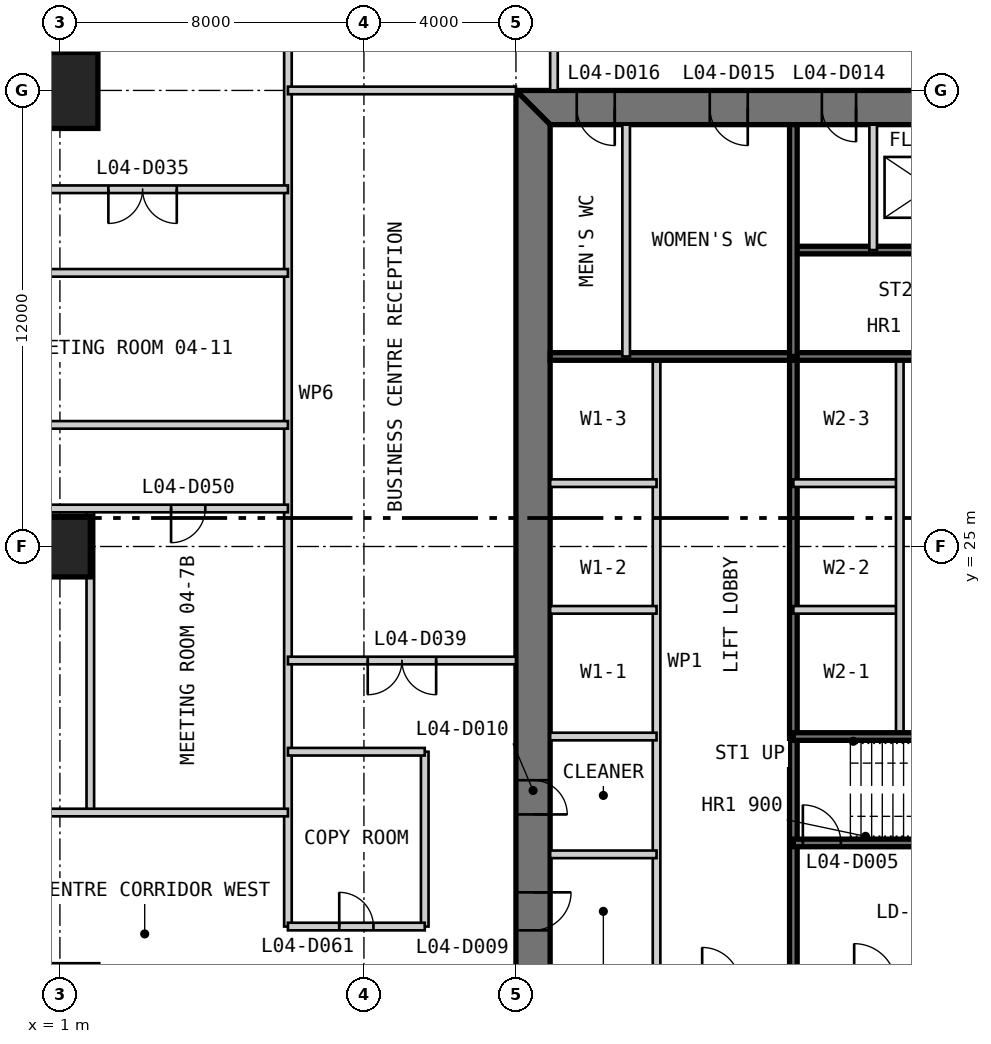
"""IFC4 building model, lengths in metres.
Left out: names, types, materials, properties, quantities, classifications, styles, units other than length and angle.
Written with IfcOpenShell. Run it as: python <this file> out.ifc"""

import sys

from ifc_helpers import new_model, si_unit, direction, frame, frame_2d, origin, origin_2d, place, context, subcontext, project, spatial, polyline, rectangle, outline, extrude, element, fill, save


model = new_model("IFC4")
c1 = context("Model", 3, precision=1e-05, world=origin(), true_north=direction((0.0, 1.0)))
c2 = subcontext(c1, "Body", "Model", "MODEL_VIEW")
j1 = project(units=[si_unit("LENGTHUNIT", "METRE"), si_unit("PLANEANGLEUNIT", "RADIAN")], contexts=[c1])
p1 = place(None, origin())
s1 = spatial("IfcSite", under=j1, at=p1, CompositionType="ELEMENT")
p2 = place(p1, origin())
s2 = spatial("IfcBuilding", under=s1, at=p2, CompositionType="ELEMENT")
p3 = place(p2, frame((0.0, 0.0, 21.4)))
s3 = spatial("IfcBuildingStorey", under=s2, at=p3, CompositionType="ELEMENT", Elevation=21.4)
p4 = place(p3, frame((1.0, 37.0, 0.0), z_axis=(0.0, 0.0, 1.0), x_axis=(1.0, 0.0, 0.0)))
e1 = element("IfcColumn", 1, at=p4, inside=s3, PredefinedType="COLUMN", context=c2, shape_type="SweptSolid", body=[
    extrude(rectangle(XDim=2.0, YDim=2.0, at=origin_2d()), origin(), (0.0, 0.0, 1.0), 4.8),
])
p5 = place(p3, frame((1.0, 25.0, 0.0), z_axis=(0.0, 0.0, 1.0), x_axis=(1.0, 0.0, 0.0)))
e2 = element("IfcColumn", 2, at=p5, inside=s3, PredefinedType="COLUMN", context=c2, shape_type="SweptSolid", body=[
    extrude(rectangle(XDim=1.6, YDim=1.6, at=origin_2d()), origin(), (0.0, 0.0, 1.0), 4.8),
])
p6 = place(p3, frame((37.0, 36.55, 0.0), z_axis=(0.0, 0.0, 1.0), x_axis=(-1.0, 0.0, 0.0)))
e3 = element("IfcWall", 3, at=p6, inside=s3, PredefinedType="SHEAR", context=c2, shape_type="SweptSolid", body=[
    extrude(outline(polyline([(0.0, -0.45), (24.0, -0.45), (23.1, 0.45), (0.9, 0.45), (0.0, -0.45)])), origin(), (0.0, 0.0, 1.0), 4.8),
])
p7 = place(p6, frame((4.9, 0.0, 0.0)))
e4 = element("IfcOpeningElement", 4, at=p7, cuts=e3, PredefinedType="OPENING", context=c2, shape_type="SweptSolid", body=[
    extrude(rectangle(XDim=1.0, YDim=2.2, at=frame_2d((0.5, 1.1))), frame((0.0, 0.46, 0.0), z_axis=(0.0, -1.0, 0.0), x_axis=(1.0, 0.0, 0.0)), (0.0, 0.0, 1.0), 0.92),
])
p8 = place(p6, frame((8.9, 0.0, 0.0)))
e5 = element("IfcOpeningElement", 5, at=p8, cuts=e3, PredefinedType="OPENING", context=c2, shape_type="SweptSolid", body=[
    extrude(rectangle(XDim=1.1, YDim=2.2, at=frame_2d((0.55, 1.1))), frame((0.0, 0.46, 0.0), z_axis=(0.0, -1.0, 0.0), x_axis=(1.0, 0.0, 0.0)), (0.0, 0.0, 1.0), 0.92),
])
p9 = place(p6, frame((15.05, 0.0, 0.0)))
e6 = element("IfcOpeningElement", 6, at=p9, cuts=e3, PredefinedType="OPENING", context=c2, shape_type="SweptSolid", body=[
    extrude(rectangle(XDim=0.9, YDim=2.2, at=frame_2d((0.45, 1.1))), frame((0.0, 0.46, 0.0), z_axis=(0.0, -1.0, 0.0), x_axis=(1.0, 0.0, 0.0)), (0.0, 0.0, 1.0), 0.92),
])
p10 = place(p6, frame((17.9, 0.0, 0.0)))
e7 = element("IfcOpeningElement", 7, at=p10, cuts=e3, PredefinedType="OPENING", context=c2, shape_type="SweptSolid", body=[
    extrude(rectangle(XDim=1.0, YDim=2.2, at=frame_2d((0.5, 1.1))), frame((0.0, 0.46, 0.0), z_axis=(0.0, -1.0, 0.0), x_axis=(1.0, 0.0, 0.0)), (0.0, 0.0, 1.0), 0.92),
])
p11 = place(p6, frame((21.4, 0.0, 0.0)))
e8 = element("IfcOpeningElement", 8, at=p11, cuts=e3, PredefinedType="OPENING", context=c2, shape_type="SweptSolid", body=[
    extrude(rectangle(XDim=1.0, YDim=2.2, at=frame_2d((0.5, 1.1))), frame((0.0, 0.46, 0.0), z_axis=(0.0, -1.0, 0.0), x_axis=(1.0, 0.0, 0.0)), (0.0, 0.0, 1.0), 0.92),
])
p12 = place(p3, frame((13.45, 36.1, 0.0), z_axis=(0.0, 0.0, 1.0), x_axis=(0.0, -1.0, 0.0)))
e9 = element("IfcWall", 9, at=p12, inside=s3, PredefinedType="SHEAR", context=c2, shape_type="SweptSolid", body=[
    extrude(outline(polyline([(-0.9, -0.45), (23.1, -0.45), (22.2, 0.45), (0.0, 0.45), (-0.9, -0.45)])), origin(), (0.0, 0.0, 1.0), 4.8),
])
p13 = place(p12, frame((20.2, 0.0, 0.0)))
e10 = element("IfcOpeningElement", 10, at=p13, cuts=e9, PredefinedType="OPENING", context=c2, shape_type="SweptSolid", body=[
    extrude(rectangle(XDim=1.0, YDim=2.2, at=frame_2d((0.5, 1.1))), frame((0.0, 0.46, 0.0), z_axis=(0.0, -1.0, 0.0), x_axis=(1.0, 0.0, 0.0)), (0.0, 0.0, 1.0), 0.92),
])
p14 = place(p12, frame((17.25, 0.0, 0.0)))
e11 = element("IfcOpeningElement", 11, at=p14, cuts=e9, PredefinedType="OPENING", context=c2, shape_type="SweptSolid", body=[
    extrude(rectangle(XDim=0.9, YDim=2.2, at=frame_2d((0.45, 1.1))), frame((0.0, 0.46, 0.0), z_axis=(0.0, -1.0, 0.0), x_axis=(1.0, 0.0, 0.0)), (0.0, 0.0, 1.0), 0.92),
])
p15 = place(p3, frame((16.7, 13.9, 0.0), z_axis=(0.0, 0.0, 1.0), x_axis=(0.0, 1.0, 0.0)))
e12 = element("IfcWall", 12, at=p15, inside=s3, PredefinedType="PARTITIONING", context=c2, shape_type="SweptSolid", body=[
    extrude(rectangle(XDim=16.1, YDim=0.2, at=frame_2d((8.05, 0.0))), origin(), (0.0, 0.0, 1.0), 4.6),
])
p16 = place(p3, frame((20.3, 13.9, 0.0), z_axis=(0.0, 0.0, 1.0), x_axis=(0.0, 1.0, 0.0)))
e13 = element("IfcWall", 13, at=p16, inside=s3, PredefinedType="SOLIDWALL", context=c2, shape_type="SweptSolid", body=[
    extrude(rectangle(XDim=16.1, YDim=0.2, at=frame_2d((8.05, 0.0))), origin(), (0.0, 0.0, 1.0), 4.6),
])
for number, where, z_axis, x_axis in (
    (14, (13.9, 20.0, 0.0), (0.0, 0.0, 1.0), (1.0, 0.0, 0.0)),
    (15, (13.9, 23.333, 0.0), (0.0, 0.0, 1.0), (1.0, 0.0, 0.0)),
    (16, (13.9, 26.667, 0.0), (0.0, 0.0, 1.0), (1.0, 0.0, 0.0)),
    (17, (20.3, 23.333, 0.0), (0.0, 0.0, 1.0), (1.0, 0.0, 0.0)),
    (18, (20.3, 26.667, 0.0), (0.0, 0.0, 1.0), (1.0, 0.0, 0.0)),
):
    element("IfcWall", number, at=place(p3, frame(where, z_axis=z_axis, x_axis=x_axis)), inside=s3, PredefinedType="PARTITIONING", context=c2, shape_type="SweptSolid", body=[
        extrude(rectangle(XDim=2.8, YDim=0.2, at=frame_2d((1.4, 0.0))), origin(), (0.0, 0.0, 1.0), 4.6),
    ])
p17 = place(p3, frame((23.1, 20.0, 0.0), z_axis=(0.0, 0.0, 1.0), x_axis=(0.0, 1.0, 0.0)))
e19 = element("IfcWall", 19, at=p17, inside=s3, PredefinedType="PARTITIONING", context=c2, shape_type="SweptSolid", body=[
    extrude(rectangle(XDim=10.0, YDim=0.2, at=frame_2d((5.0, 0.0))), origin(), (0.0, 0.0, 1.0), 4.6),
])
p18 = place(p3, frame((20.3, 17.2, 0.0), z_axis=(0.0, 0.0, 1.0), x_axis=(1.0, 0.0, 0.0)))
e20 = element("IfcWall", 20, at=p18, inside=s3, PredefinedType="SOLIDWALL", context=c2, shape_type="SweptSolid", body=[
    extrude(rectangle(XDim=9.4, YDim=0.2, at=frame_2d((4.7, 0.0))), origin(), (0.0, 0.0, 1.0), 4.6),
])
p19 = place(p18, frame((0.25, 0.0, 0.0)))
e21 = element("IfcOpeningElement", 21, at=p19, cuts=e20, PredefinedType="OPENING", context=c2, shape_type="SweptSolid", body=[
    extrude(rectangle(XDim=1.0, YDim=2.2, at=frame_2d((0.5, 1.1))), frame((0.0, 0.11, 0.0), z_axis=(0.0, -1.0, 0.0), x_axis=(1.0, 0.0, 0.0)), (0.0, 0.0, 1.0), 0.22),
])
p20 = place(p3, frame((20.3, 20.0, 0.0), z_axis=(0.0, 0.0, 1.0), x_axis=(1.0, 0.0, 0.0)))
e22 = element("IfcWall", 22, at=p20, inside=s3, PredefinedType="SOLIDWALL", context=c2, shape_type="SweptSolid", body=[
    extrude(rectangle(XDim=15.8, YDim=0.2, at=frame_2d((7.9, 0.0))), origin(), (0.0, 0.0, 1.0), 4.6),
])
p21 = place(p3, frame((13.9, 16.9, 0.0), z_axis=(0.0, 0.0, 1.0), x_axis=(1.0, 0.0, 0.0)))
e23 = element("IfcWall", 23, at=p21, inside=s3, PredefinedType="PARTITIONING", context=c2, shape_type="SweptSolid", body=[
    extrude(rectangle(XDim=2.8, YDim=0.2, at=frame_2d((1.4, 0.0))), origin(), (0.0, 0.0, 1.0), 4.6),
])
p22 = place(p3, frame((29.7, 32.8, 0.0), z_axis=(0.0, 0.0, 1.0), x_axis=(-1.0, 0.0, 0.0)))
e24 = element("IfcWall", 24, at=p22, inside=s3, PredefinedType="SOLIDWALL", context=c2, shape_type="SweptSolid", body=[
    extrude(rectangle(XDim=9.4, YDim=0.2, at=frame_2d((4.7, 0.0))), origin(), (0.0, 0.0, 1.0), 4.6),
])
p23 = place(p22, frame((0.25, 0.0, 0.0)))
e25 = element("IfcOpeningElement", 25, at=p23, cuts=e24, PredefinedType="OPENING", context=c2, shape_type="SweptSolid", body=[
    extrude(rectangle(XDim=1.0, YDim=2.2, at=frame_2d((0.5, 1.1))), frame((0.0, 0.11, 0.0), z_axis=(0.0, -1.0, 0.0), x_axis=(1.0, 0.0, 0.0)), (0.0, 0.0, 1.0), 0.22),
])
p24 = place(p3, frame((29.7, 30.0, 0.0), z_axis=(0.0, 0.0, 1.0), x_axis=(-1.0, 0.0, 0.0)))
e26 = element("IfcWall", 26, at=p24, inside=s3, PredefinedType="SOLIDWALL", context=c2, shape_type="SweptSolid", body=[
    extrude(rectangle(XDim=15.8, YDim=0.2, at=frame_2d((7.9, 0.0))), origin(), (0.0, 0.0, 1.0), 4.6),
])
p25 = place(p3, frame((22.4, 36.1, 0.0), z_axis=(0.0, 0.0, 1.0), x_axis=(0.0, -1.0, 0.0)))
e27 = element("IfcWall", 27, at=p25, inside=s3, PredefinedType="PARTITIONING", context=c2, shape_type="SweptSolid", body=[
    extrude(rectangle(XDim=3.3, YDim=0.2, at=frame_2d((1.65, 0.0))), origin(), (0.0, 0.0, 1.0), 4.6),
])
p26 = place(p3, frame((20.3, 36.1, 0.0), z_axis=(0.0, 0.0, 1.0), x_axis=(0.0, -1.0, 0.0)))
e28 = element("IfcWall", 28, at=p26, inside=s3, PredefinedType="SOLIDWALL", context=c2, shape_type="SweptSolid", body=[
    extrude(rectangle(XDim=6.1, YDim=0.2, at=frame_2d((3.05, 0.0))), origin(), (0.0, 0.0, 1.0), 4.6),
])
p27 = place(p3, frame((15.9, 36.1, 0.0), z_axis=(0.0, 0.0, 1.0), x_axis=(0.0, -1.0, 0.0)))
e29 = element("IfcWall", 29, at=p27, inside=s3, PredefinedType="PARTITIONING", context=c2, shape_type="SweptSolid", body=[
    extrude(rectangle(XDim=6.1, YDim=0.2, at=frame_2d((3.05, 0.0))), origin(), (0.0, 0.0, 1.0), 4.6),
])
p28 = place(p3, frame((1.8, 18.0, 0.0), z_axis=(0.0, 0.0, 1.0), x_axis=(0.0, 1.0, 0.0)))
e30 = element("IfcWall", 30, at=p28, inside=s3, PredefinedType="PARTITIONING", context=c2, shape_type="SweptSolid", body=[
    extrude(rectangle(XDim=8.0, YDim=0.2, at=frame_2d((4.0, 0.0))), origin(), (0.0, 0.0, 1.0), 4.5),
])
p29 = place(p3, frame((7.0, 15.0, 0.0), z_axis=(0.0, 0.0, 1.0), x_axis=(0.0, 1.0, 0.0)))
e31 = element("IfcWall", 31, at=p29, inside=s3, PredefinedType="PARTITIONING", context=c2, shape_type="SweptSolid", body=[
    extrude(rectangle(XDim=28.0, YDim=0.2, at=frame_2d((14.0, 0.0))), origin(), (0.0, 0.0, 1.0), 3.843),
])
p30 = place(p3, frame((10.6, 15.0, 0.0), z_axis=(0.0, 0.0, 1.0), x_axis=(0.0, 1.0, 0.0)))
e32 = element("IfcWall", 32, at=p30, inside=s3, PredefinedType="PARTITIONING", context=c2, shape_type="SweptSolid", body=[
    extrude(rectangle(XDim=4.6, YDim=0.2, at=frame_2d((2.3, 0.0))), origin(), (0.0, 0.0, 1.0), 4.5),
])
p31 = place(p3, frame((14.0, 37.0, 0.0), z_axis=(0.0, 0.0, 1.0), x_axis=(0.0, 1.0, 0.0)))
e33 = element("IfcWall", 33, at=p31, inside=s3, PredefinedType="PARTITIONING", context=c2, shape_type="SweptSolid", body=[
    extrude(rectangle(XDim=6.0, YDim=0.2, at=frame_2d((3.0, 0.0))), origin(), (0.0, 0.0, 1.0), 4.5),
])
p32 = place(p31, frame((2.55, 0.0, 0.0)))
e34 = element("IfcOpeningElement", 34, at=p32, cuts=e33, PredefinedType="OPENING", context=c2, shape_type="SweptSolid", body=[
    extrude(rectangle(XDim=0.9, YDim=2.2, at=frame_2d((0.45, 1.1))), frame((0.0, 0.11, 0.0), z_axis=(0.0, -1.0, 0.0), x_axis=(1.0, 0.0, 0.0)), (0.0, 0.0, 1.0), 0.22),
])
p33 = place(p3, frame((7.0, 15.0, 0.0), z_axis=(0.0, 0.0, 1.0), x_axis=(1.0, 0.0, 0.0)))
e35 = element("IfcWall", 35, at=p33, inside=s3, PredefinedType="PARTITIONING", context=c2, shape_type="SweptSolid", body=[
    extrude(rectangle(XDim=3.6, YDim=0.2, at=frame_2d((1.8, 0.0))), origin(), (0.0, 0.0, 1.0), 4.5),
])
p34 = place(p33, frame((1.35, 0.0, 0.0)))
e36 = element("IfcOpeningElement", 36, at=p34, cuts=e35, PredefinedType="OPENING", context=c2, shape_type="SweptSolid", body=[
    extrude(rectangle(XDim=0.9, YDim=2.2, at=frame_2d((0.45, 1.1))), frame((0.0, 0.11, 0.0), z_axis=(0.0, -1.0, 0.0), x_axis=(1.0, 0.0, 0.0)), (0.0, 0.0, 1.0), 0.22),
])
p35 = place(p3, frame((-2.0, 18.0, 0.0), z_axis=(0.0, 0.0, 1.0), x_axis=(1.0, 0.0, 0.0)))
e37 = element("IfcWall", 37, at=p35, inside=s3, PredefinedType="PARTITIONING", context=c2, shape_type="SweptSolid", body=[
    extrude(rectangle(XDim=9.0, YDim=0.2, at=frame_2d((4.5, 0.0))), origin(), (0.0, 0.0, 1.0), 4.5),
])
p36 = place(p3, frame((7.0, 19.6, 0.0), z_axis=(0.0, 0.0, 1.0), x_axis=(1.0, 0.0, 0.0)))
e38 = element("IfcWall", 38, at=p36, inside=s3, PredefinedType="PARTITIONING", context=c2, shape_type="SweptSolid", body=[
    extrude(rectangle(XDim=3.6, YDim=0.2, at=frame_2d((1.8, 0.0))), origin(), (0.0, 0.0, 1.0), 4.5),
])
p37 = place(p3, frame((7.0, 22.0, 0.0), z_axis=(0.0, 0.0, 1.0), x_axis=(1.0, 0.0, 0.0)))
e39 = element("IfcWall", 39, at=p37, inside=s3, PredefinedType="PARTITIONING", context=c2, shape_type="SweptSolid", body=[
    extrude(rectangle(XDim=6.0, YDim=0.2, at=frame_2d((3.0, 0.0))), origin(), (0.0, 0.0, 1.0), 4.5),
])
p38 = place(p37, frame((2.1, 0.0, 0.0)))
e40 = element("IfcOpeningElement", 40, at=p38, cuts=e39, PredefinedType="OPENING", context=c2, shape_type="SweptSolid", body=[
    extrude(rectangle(XDim=1.8, YDim=2.4, at=frame_2d((0.9, 1.2))), frame((0.0, 0.11, 0.0), z_axis=(0.0, -1.0, 0.0), x_axis=(1.0, 0.0, 0.0)), (0.0, 0.0, 1.0), 0.22),
])
p39 = place(p3, frame((-2.0, 26.0, 0.0), z_axis=(0.0, 0.0, 1.0), x_axis=(1.0, 0.0, 0.0)))
e41 = element("IfcWall", 41, at=p39, inside=s3, PredefinedType="PARTITIONING", context=c2, shape_type="SweptSolid", body=[
    extrude(rectangle(XDim=9.0, YDim=0.2, at=frame_2d((4.5, 0.0))), origin(), (0.0, 0.0, 1.0), 4.5),
])
p40 = place(p39, frame((0.725, 0.0, 0.0)))
e42 = element("IfcOpeningElement", 42, at=p40, cuts=e41, PredefinedType="OPENING", context=c2, shape_type="SweptSolid", body=[
    extrude(rectangle(XDim=0.9, YDim=2.2, at=frame_2d((0.45, 1.1))), frame((0.0, 0.11, 0.0), z_axis=(0.0, -1.0, 0.0), x_axis=(1.0, 0.0, 0.0)), (0.0, 0.0, 1.0), 0.22),
])
p41 = place(p39, frame((5.925, 0.0, 0.0)))
e43 = element("IfcOpeningElement", 43, at=p41, cuts=e41, PredefinedType="OPENING", context=c2, shape_type="SweptSolid", body=[
    extrude(rectangle(XDim=0.9, YDim=2.2, at=frame_2d((0.45, 1.1))), frame((0.0, 0.11, 0.0), z_axis=(0.0, -1.0, 0.0), x_axis=(1.0, 0.0, 0.0)), (0.0, 0.0, 1.0), 0.22),
])
for number, where, z_axis, x_axis in (
    (44, (-1.4, 28.2, 0.0), (0.0, 0.0, 1.0), (1.0, 0.0, 0.0)),
    (45, (-1.4, 32.2, 0.0), (0.0, 0.0, 1.0), (1.0, 0.0, 0.0)),
):
    element("IfcWall", number, at=place(p3, frame(where, z_axis=z_axis, x_axis=x_axis)), inside=s3, PredefinedType="PARTITIONING", context=c2, shape_type="SweptSolid", body=[
        extrude(rectangle(XDim=8.4, YDim=0.2, at=frame_2d((4.2, 0.0))), origin(), (0.0, 0.0, 1.0), 4.5),
    ])
p42 = place(p3, frame((-7.25, 34.4, 0.0), z_axis=(0.0, 0.0, 1.0), x_axis=(1.0, 0.0, 0.0)))
e46 = element("IfcWall", 46, at=p42, inside=s3, PredefinedType="PARTITIONING", context=c2, shape_type="SweptSolid", body=[
    extrude(rectangle(XDim=14.25, YDim=0.2, at=frame_2d((7.125, 0.0))), origin(), (0.0, 0.0, 1.0), 4.5),
])
p43 = place(p42, frame((9.525, 0.0, 0.0)))
e47 = element("IfcOpeningElement", 47, at=p43, cuts=e46, PredefinedType="OPENING", context=c2, shape_type="SweptSolid", body=[
    extrude(rectangle(XDim=1.8, YDim=2.4, at=frame_2d((0.9, 1.2))), frame((0.0, 0.11, 0.0), z_axis=(0.0, -1.0, 0.0), x_axis=(1.0, 0.0, 0.0)), (0.0, 0.0, 1.0), 0.22),
])
p44 = place(p42, frame((2.45, 0.0, 0.0)))
e48 = element("IfcOpeningElement", 48, at=p44, cuts=e46, PredefinedType="OPENING", context=c2, shape_type="SweptSolid", body=[
    extrude(rectangle(XDim=1.8, YDim=2.4, at=frame_2d((0.9, 1.2))), frame((0.0, 0.11, 0.0), z_axis=(0.0, -1.0, 0.0), x_axis=(1.0, 0.0, 0.0)), (0.0, 0.0, 1.0), 0.22),
])
p45 = place(p3, frame((7.0, 37.0, 0.0), z_axis=(0.0, 0.0, 1.0), x_axis=(1.0, 0.0, 0.0)))
e49 = element("IfcWall", 49, at=p45, inside=s3, PredefinedType="PARTITIONING", context=c2, shape_type="SweptSolid", body=[
    extrude(rectangle(XDim=6.0, YDim=0.2, at=frame_2d((3.0, 0.0))), origin(), (0.0, 0.0, 1.0), 3.653),
])
p46 = place(p19, origin())
e50 = element("IfcDoor", 50, at=p46, inside=s3, OperationType="SINGLE_SWING_LEFT", PredefinedType="DOOR", context=c2, shape_type="SweptSolid", body=[
    extrude(rectangle(XDim=1.0, YDim=2.2, at=frame_2d((0.5, 1.1))), frame((0.0, 0.025, 0.0), z_axis=(0.0, -1.0, 0.0), x_axis=(1.0, 0.0, 0.0)), (0.0, 0.0, 1.0), 0.05),
])
fill(e21, e50)
p47 = place(p13, origin())
e51 = element("IfcDoor", 51, at=p47, inside=s3, OperationType="SINGLE_SWING_LEFT", PredefinedType="DOOR", context=c2, shape_type="SweptSolid", body=[
    extrude(rectangle(XDim=1.0, YDim=2.2, at=frame_2d((0.5, 1.1))), frame((0.0, 0.025, 0.0), z_axis=(0.0, -1.0, 0.0), x_axis=(1.0, 0.0, 0.0)), (0.0, 0.0, 1.0), 0.05),
    extrude(outline(polyline([(0.0, 0.0), (0.04, 0.0), (0.04, 2.16), (0.96, 2.16), (0.96, 0.0), (1.0, 0.0), (1.0, 2.2), (0.0, 2.2), (0.0, 0.0)])), frame((0.0, 0.3, 0.0), z_axis=(0.0, -1.0, 0.0), x_axis=(1.0, 0.0, 0.0)), (0.0, 0.0, 1.0), 0.6),
])
fill(e10, e51)
p48 = place(p14, origin())
e52 = element("IfcDoor", 52, at=p48, inside=s3, OperationType="SINGLE_SWING_RIGHT", PredefinedType="DOOR", context=c2, shape_type="SweptSolid", body=[
    extrude(rectangle(XDim=0.9, YDim=2.2, at=frame_2d((0.45, 1.1))), frame((0.0, 0.025, 0.0), z_axis=(0.0, -1.0, 0.0), x_axis=(1.0, 0.0, 0.0)), (0.0, 0.0, 1.0), 0.05),
    extrude(outline(polyline([(0.0, 0.0), (0.04, 0.0), (0.04, 2.16), (0.86, 2.16), (0.86, 0.0), (0.9, 0.0), (0.9, 2.2), (0.0, 2.2), (0.0, 0.0)])), frame((0.0, 0.3, 0.0), z_axis=(0.0, -1.0, 0.0), x_axis=(1.0, 0.0, 0.0)), (0.0, 0.0, 1.0), 0.6),
])
fill(e11, e52)
p49 = place(p9, origin())
e53 = element("IfcDoor", 53, at=p49, inside=s3, OperationType="SINGLE_SWING_LEFT", PredefinedType="DOOR", context=c2, shape_type="SweptSolid", body=[
    extrude(rectangle(XDim=0.9, YDim=2.2, at=frame_2d((0.45, 1.1))), frame((0.0, 0.025, 0.0), z_axis=(0.0, -1.0, 0.0), x_axis=(1.0, 0.0, 0.0)), (0.0, 0.0, 1.0), 0.05),
    extrude(outline(polyline([(0.0, 0.0), (0.04, 0.0), (0.04, 2.16), (0.86, 2.16), (0.86, 0.0), (0.9, 0.0), (0.9, 2.2), (0.0, 2.2), (0.0, 0.0)])), frame((0.0, 0.3, 0.0), z_axis=(0.0, -1.0, 0.0), x_axis=(1.0, 0.0, 0.0)), (0.0, 0.0, 1.0), 0.6),
])
fill(e6, e53)
p50 = place(p10, origin())
e54 = element("IfcDoor", 54, at=p50, inside=s3, OperationType="SINGLE_SWING_LEFT", PredefinedType="DOOR", context=c2, shape_type="SweptSolid", body=[
    extrude(rectangle(XDim=1.0, YDim=2.2, at=frame_2d((0.5, 1.1))), frame((0.0, 0.025, 0.0), z_axis=(0.0, -1.0, 0.0), x_axis=(1.0, 0.0, 0.0)), (0.0, 0.0, 1.0), 0.05),
    extrude(outline(polyline([(0.0, 0.0), (0.04, 0.0), (0.04, 2.16), (0.96, 2.16), (0.96, 0.0), (1.0, 0.0), (1.0, 2.2), (0.0, 2.2), (0.0, 0.0)])), frame((0.0, 0.3, 0.0), z_axis=(0.0, -1.0, 0.0), x_axis=(1.0, 0.0, 0.0)), (0.0, 0.0, 1.0), 0.6),
])
fill(e7, e54)
p51 = place(p11, origin())
e55 = element("IfcDoor", 55, at=p51, inside=s3, OperationType="SINGLE_SWING_LEFT", PredefinedType="DOOR", context=c2, shape_type="SweptSolid", body=[
    extrude(rectangle(XDim=1.0, YDim=2.2, at=frame_2d((0.5, 1.1))), frame((0.0, 0.025, 0.0), z_axis=(0.0, -1.0, 0.0), x_axis=(1.0, 0.0, 0.0)), (0.0, 0.0, 1.0), 0.05),
    extrude(outline(polyline([(0.0, 0.0), (0.04, 0.0), (0.04, 2.16), (0.96, 2.16), (0.96, 0.0), (1.0, 0.0), (1.0, 2.2), (0.0, 2.2), (0.0, 0.0)])), frame((0.0, 0.3, 0.0), z_axis=(0.0, -1.0, 0.0), x_axis=(1.0, 0.0, 0.0)), (0.0, 0.0, 1.0), 0.6),
])
fill(e8, e55)
p52 = place(p43, frame((1.8, 0.0, 0.0), z_axis=(0.0, 0.0, 1.0), x_axis=(-1.0, 0.0, 0.0)))
e56 = element("IfcDoor", 56, at=p52, inside=s3, OperationType="DOUBLE_DOOR_SINGLE_SWING", PredefinedType="DOOR", context=c2, shape_type="SweptSolid", body=[
    extrude(rectangle(XDim=1.8, YDim=2.4, at=frame_2d((0.9, 1.2))), frame((0.0, 0.025, 0.0), z_axis=(0.0, -1.0, 0.0), x_axis=(1.0, 0.0, 0.0)), (0.0, 0.0, 1.0), 0.05),
])
fill(e47, e56)
p53 = place(p38, frame((1.8, 0.0, 0.0), z_axis=(0.0, 0.0, 1.0), x_axis=(-1.0, 0.0, 0.0)))
e57 = element("IfcDoor", 57, at=p53, inside=s3, OperationType="DOUBLE_DOOR_SINGLE_SWING", PredefinedType="DOOR", context=c2, shape_type="SweptSolid", body=[
    extrude(rectangle(XDim=1.8, YDim=2.4, at=frame_2d((0.9, 1.2))), frame((0.0, 0.025, 0.0), z_axis=(0.0, -1.0, 0.0), x_axis=(1.0, 0.0, 0.0)), (0.0, 0.0, 1.0), 0.05),
])
fill(e40, e57)
p54 = place(p41, frame((0.9, 0.0, 0.0), z_axis=(0.0, 0.0, 1.0), x_axis=(-1.0, 0.0, 0.0)))
e58 = element("IfcDoor", 58, at=p54, inside=s3, OperationType="SINGLE_SWING_RIGHT", PredefinedType="DOOR", context=c2, shape_type="SweptSolid", body=[
    extrude(rectangle(XDim=0.9, YDim=2.2, at=frame_2d((0.45, 1.1))), frame((0.0, 0.025, 0.0), z_axis=(0.0, -1.0, 0.0), x_axis=(1.0, 0.0, 0.0)), (0.0, 0.0, 1.0), 0.05),
])
fill(e43, e58)
p55 = place(p34, origin())
e59 = element("IfcDoor", 59, at=p55, inside=s3, OperationType="SINGLE_SWING_LEFT", PredefinedType="DOOR", context=c2, shape_type="SweptSolid", body=[
    extrude(rectangle(XDim=0.9, YDim=2.2, at=frame_2d((0.45, 1.1))), frame((0.0, 0.025, 0.0), z_axis=(0.0, -1.0, 0.0), x_axis=(1.0, 0.0, 0.0)), (0.0, 0.0, 1.0), 0.05),
])
fill(e36, e59)
save(model, sys.argv[1])
